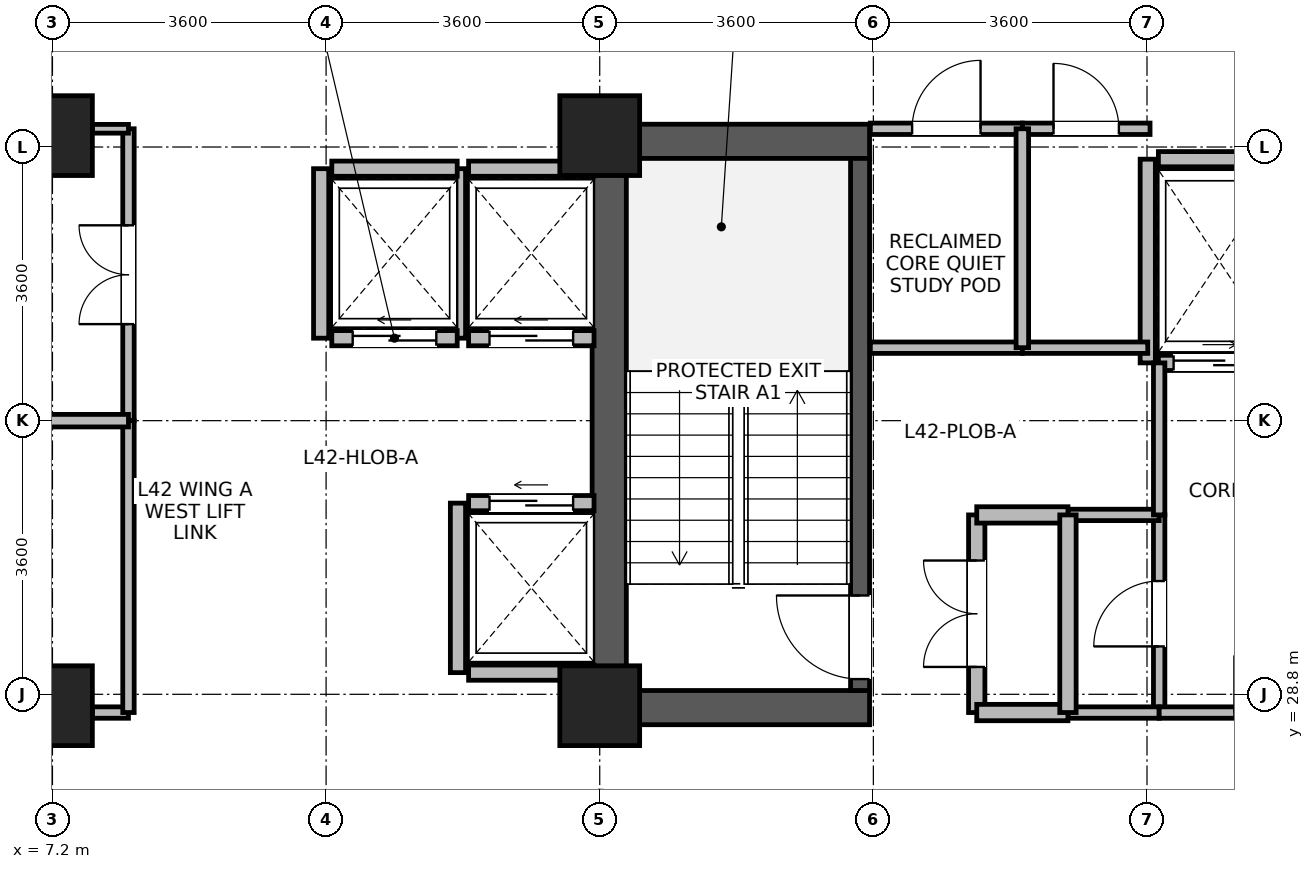
"""IFC4 building model, lengths in metres.
Left out: names, types, materials, properties, quantities, classifications, styles, units other than length and angle.
Written with IfcOpenShell. Run it as: python <this file> out.ifc"""

import sys

from ifc_helpers import new_model, si_unit, direction, frame, frame_2d, origin, origin_2d, place, context, subcontext, project, spatial, rectangle, extrude, source, transform, mapped, element, fill, save


model = new_model("IFC4")
c1 = context("Model", 3, precision=1e-05, world=origin(), true_north=direction((0.0, 1.0)))
c2 = subcontext(c1, "Body", "Model", "MODEL_VIEW")
j1 = project(units=[si_unit("LENGTHUNIT", "METRE"), si_unit("PLANEANGLEUNIT", "RADIAN")], contexts=[c1])
p1 = place(None, origin())
s1 = spatial("IfcSite", under=j1, at=p1, CompositionType="ELEMENT")
p2 = place(p1, origin())
s2 = spatial("IfcBuilding", under=s1, at=p2, CompositionType="ELEMENT")
p3 = place(p2, frame((0.0, 0.0, 166.1)))
s3 = spatial("IfcBuildingStorey", under=s2, at=p3, CompositionType="ELEMENT", Elevation=166.1)
p4 = place(p3, frame((14.525, 28.4, 0.0), z_axis=(0.0, 0.0, 1.0), x_axis=(0.0, 1.0, 0.0)))
e1 = element("IfcWall", 1, at=p4, inside=s3, PredefinedType="SHEAR", context=c2, shape_type="SweptSolid", body=[
    extrude(rectangle(XDim=7.9, YDim=0.45, at=frame_2d((3.95, 0.0))), origin(), (0.0, 0.0, 1.0), 3.46),
])
for number, where, z_axis, x_axis in (
    (2, (14.75, 28.625, 0.0), (0.0, 0.0, 1.0), (1.0, 0.0, 0.0)),
    (3, (14.75, 36.075, 0.0), (0.0, 0.0, 1.0), (1.0, 0.0, 0.0)),
):
    element("IfcWall", number, at=place(p3, frame(where, z_axis=z_axis, x_axis=x_axis)), inside=s3, PredefinedType="SHEAR", context=c2, shape_type="SweptSolid", body=[
        extrude(rectangle(XDim=3.2, YDim=0.45, at=frame_2d((1.6, 0.0))), origin(), (0.0, 0.0, 1.0), 3.46),
    ])
p5 = place(p3, frame((17.825, 28.85, 0.0), z_axis=(0.0, 0.0, 1.0), x_axis=(0.0, 1.0, 0.0)))
e4 = element("IfcWall", 4, at=p5, inside=s3, PredefinedType="SHEAR", context=c2, shape_type="SweptSolid", body=[
    extrude(rectangle(XDim=7.0, YDim=0.25, at=frame_2d((3.5, 0.0))), origin(), (0.0, 0.0, 1.0), 3.46),
])
p6 = place(p5, frame((0.15, 0.0, 0.0)))
e5 = element("IfcOpeningElement", 5, at=p6, cuts=e4, PredefinedType="OPENING", context=c2, shape_type="SweptSolid", body=[
    extrude(rectangle(XDim=1.1, YDim=2.08, at=frame_2d((0.55, 1.04))), frame((0.0, 0.135, 0.0), z_axis=(0.0, -1.0, 0.0), x_axis=(1.0, 0.0, 0.0)), (0.0, 0.0, 1.0), 0.27),
])
m1 = source(origin(), c2, "Body", "SweptSolid", [
    extrude(rectangle(XDim=1.05, YDim=1.05, at=origin_2d()), origin(), (0.0, 0.0, 1.0), 3.7),
])
for number, where, z_axis, x_axis in (
    (6, (7.2, 28.65, 0.0), (0.0, 0.0, 1.0), (1.0, 0.0, 0.0)),
    (7, (7.2, 36.15, 0.0), (0.0, 0.0, 1.0), (1.0, 0.0, 0.0)),
    (8, (14.4, 28.65, 0.0), (0.0, 0.0, 1.0), (1.0, 0.0, 0.0)),
    (9, (14.4, 36.15, 0.0), (0.0, 0.0, 1.0), (1.0, 0.0, 0.0)),
):
    element("IfcColumn", number, at=place(p3, frame(where, z_axis=z_axis, x_axis=x_axis)), inside=s3, PredefinedType="COLUMN", context=c2, shape_type="MappedRepresentation", body=[
        mapped(m1, transform((0.0, 0.0, 0.0), x_axis=(1.0, 0.0, 0.0), y_axis=(0.0, 1.0, 0.0), z_axis=(0.0, 0.0, 1.0), scale=1.0)),
    ])
p7 = place(p3, frame((12.675, 33.485, 0.0), z_axis=(0.0, 0.0, 1.0), x_axis=(1.0, 0.0, 0.0)))
e10 = element("IfcWall", 10, at=p7, inside=s3, PredefinedType="PARTITIONING", context=c2, shape_type="SweptSolid", body=[
    extrude(rectangle(XDim=1.65, YDim=0.2, at=frame_2d((0.825, 0.0))), origin(), (0.0, 0.0, 1.0), 3.44),
])
p8 = place(p7, frame((0.275, 0.0, 0.0)))
e11 = element("IfcOpeningElement", 11, at=p8, cuts=e10, PredefinedType="OPENING", context=c2, shape_type="SweptSolid", body=[
    extrude(rectangle(XDim=1.1, YDim=2.12, at=frame_2d((0.55, 1.06))), frame((0.0, 0.11, 0.0), z_axis=(0.0, -1.0, 0.0), x_axis=(1.0, 0.0, 0.0)), (0.0, 0.0, 1.0), 0.22),
])
p9 = place(p3, frame((12.675, 35.715, 0.0), z_axis=(0.0, 0.0, 1.0), x_axis=(1.0, 0.0, 0.0)))
e12 = element("IfcWall", 12, at=p9, inside=s3, PredefinedType="PARTITIONING", context=c2, shape_type="SweptSolid", body=[
    extrude(rectangle(XDim=1.65, YDim=0.2, at=frame_2d((0.825, 0.0))), origin(), (0.0, 0.0, 1.0), 3.44),
])
p10 = place(p3, frame((12.535, 33.485, 0.0), z_axis=(0.0, 0.0, 1.0), x_axis=(0.0, 1.0, 0.0)))
e13 = element("IfcWall", 13, at=p10, inside=s3, PredefinedType="PARTITIONING", context=c2, shape_type="SweptSolid", body=[
    extrude(rectangle(XDim=2.23, YDim=0.2, at=frame_2d((1.115, 0.0))), origin(), (0.0, 0.0, 1.0), 3.44),
])
p11 = place(p3, frame((12.675, 29.085, 0.0), z_axis=(0.0, 0.0, 1.0), x_axis=(1.0, 0.0, 0.0)))
e14 = element("IfcWall", 14, at=p11, inside=s3, PredefinedType="PARTITIONING", context=c2, shape_type="SweptSolid", body=[
    extrude(rectangle(XDim=1.65, YDim=0.2, at=frame_2d((0.825, 0.0))), origin(), (0.0, 0.0, 1.0), 3.44),
])
p12 = place(p3, frame((12.675, 31.315, 0.0), z_axis=(0.0, 0.0, 1.0), x_axis=(1.0, 0.0, 0.0)))
e15 = element("IfcWall", 15, at=p12, inside=s3, PredefinedType="PARTITIONING", context=c2, shape_type="SweptSolid", body=[
    extrude(rectangle(XDim=1.65, YDim=0.2, at=frame_2d((0.825, 0.0))), origin(), (0.0, 0.0, 1.0), 3.44),
])
p13 = place(p12, frame((0.275, 0.0, 0.0)))
e16 = element("IfcOpeningElement", 16, at=p13, cuts=e15, PredefinedType="OPENING", context=c2, shape_type="SweptSolid", body=[
    extrude(rectangle(XDim=1.1, YDim=2.12, at=frame_2d((0.55, 1.06))), frame((0.0, 0.11, 0.0), z_axis=(0.0, -1.0, 0.0), x_axis=(1.0, 0.0, 0.0)), (0.0, 0.0, 1.0), 0.22),
])
p14 = place(p3, frame((12.535, 29.085, 0.0), z_axis=(0.0, 0.0, 1.0), x_axis=(0.0, 1.0, 0.0)))
e17 = element("IfcWall", 17, at=p14, inside=s3, PredefinedType="PARTITIONING", context=c2, shape_type="SweptSolid", body=[
    extrude(rectangle(XDim=2.23, YDim=0.2, at=frame_2d((1.115, 0.0))), origin(), (0.0, 0.0, 1.0), 3.44),
])
p15 = place(p3, frame((10.875, 33.485, 0.0), z_axis=(0.0, 0.0, 1.0), x_axis=(1.0, 0.0, 0.0)))
e18 = element("IfcWall", 18, at=p15, inside=s3, PredefinedType="PARTITIONING", context=c2, shape_type="SweptSolid", body=[
    extrude(rectangle(XDim=1.65, YDim=0.2, at=frame_2d((0.825, 0.0))), origin(), (0.0, 0.0, 1.0), 3.44),
])
p16 = place(p15, frame((0.275, 0.0, 0.0)))
e19 = element("IfcOpeningElement", 19, at=p16, cuts=e18, PredefinedType="OPENING", context=c2, shape_type="SweptSolid", body=[
    extrude(rectangle(XDim=1.1, YDim=2.12, at=frame_2d((0.55, 1.06))), frame((0.0, 0.11, 0.0), z_axis=(0.0, -1.0, 0.0), x_axis=(1.0, 0.0, 0.0)), (0.0, 0.0, 1.0), 0.22),
])
p17 = place(p3, frame((10.875, 35.715, 0.0), z_axis=(0.0, 0.0, 1.0), x_axis=(1.0, 0.0, 0.0)))
e20 = element("IfcWall", 20, at=p17, inside=s3, PredefinedType="PARTITIONING", context=c2, shape_type="SweptSolid", body=[
    extrude(rectangle(XDim=1.65, YDim=0.2, at=frame_2d((0.825, 0.0))), origin(), (0.0, 0.0, 1.0), 3.44),
])
p18 = place(p3, frame((10.735, 33.485, 0.0), z_axis=(0.0, 0.0, 1.0), x_axis=(0.0, 1.0, 0.0)))
e21 = element("IfcWall", 21, at=p18, inside=s3, PredefinedType="PARTITIONING", context=c2, shape_type="SweptSolid", body=[
    extrude(rectangle(XDim=2.23, YDim=0.2, at=frame_2d((1.115, 0.0))), origin(), (0.0, 0.0, 1.0), 3.44),
])
p19 = place(p3, frame((21.75, 33.16, 0.0), z_axis=(0.0, 0.0, 1.0), x_axis=(1.0, 0.0, 0.0)))
e22 = element("IfcWall", 22, at=p19, inside=s3, PredefinedType="PARTITIONING", context=c2, shape_type="SweptSolid", body=[
    extrude(rectangle(XDim=1.6, YDim=0.2, at=frame_2d((0.8, 0.0))), origin(), (0.0, 0.0, 1.0), 3.44),
])
p20 = place(p19, frame((0.2, 0.0, 0.0)))
e23 = element("IfcOpeningElement", 23, at=p20, cuts=e22, PredefinedType="OPENING", context=c2, shape_type="SweptSolid", body=[
    extrude(rectangle(XDim=1.2, YDim=2.12, at=frame_2d((0.6, 1.06))), frame((0.0, 0.11, 0.0), z_axis=(0.0, -1.0, 0.0), x_axis=(1.0, 0.0, 0.0)), (0.0, 0.0, 1.0), 0.22),
])
p21 = place(p3, frame((21.75, 35.84, 0.0), z_axis=(0.0, 0.0, 1.0), x_axis=(1.0, 0.0, 0.0)))
e24 = element("IfcWall", 24, at=p21, inside=s3, PredefinedType="PARTITIONING", context=c2, shape_type="SweptSolid", body=[
    extrude(rectangle(XDim=1.6, YDim=0.2, at=frame_2d((0.8, 0.0))), origin(), (0.0, 0.0, 1.0), 2.44),
])
p22 = place(p3, frame((21.61, 33.16, 0.0), z_axis=(0.0, 0.0, 1.0), x_axis=(0.0, 1.0, 0.0)))
e25 = element("IfcWall", 25, at=p22, inside=s3, PredefinedType="PARTITIONING", context=c2, shape_type="SweptSolid", body=[
    extrude(rectangle(XDim=2.68, YDim=0.2, at=frame_2d((1.34, 0.0))), origin(), (0.0, 0.0, 1.0), 3.44),
])
p23 = place(p3, frame((7.725, 28.56, 0.0), z_axis=(0.0, 0.0, 1.0), x_axis=(1.0, 0.0, 0.0)))
e26 = element("IfcWall", 26, at=p23, inside=s3, PredefinedType="PARTITIONING", context=c2, shape_type="SweptSolid", body=[
    extrude(rectangle(XDim=0.475, YDim=0.15, at=frame_2d((0.237, 0.0))), origin(), (0.0, 0.0, 1.0), 2.84),
])
p24 = place(p3, frame((8.2, 32.4, 0.0), z_axis=(0.0, 0.0, 1.0), x_axis=(0.0, 1.0, 0.0)))
e27 = element("IfcWall", 27, at=p24, inside=s3, PredefinedType="PARTITIONING", context=c2, shape_type="SweptSolid", body=[
    extrude(rectangle(XDim=3.84, YDim=0.15, at=frame_2d((1.92, 0.0))), origin(), (0.0, 0.0, 1.0), 3.44),
])
p25 = place(p24, frame((1.27, 0.0, 0.0)))
e28 = element("IfcOpeningElement", 28, at=p25, cuts=e27, PredefinedType="OPENING", context=c2, shape_type="SweptSolid", body=[
    extrude(rectangle(XDim=1.3, YDim=2.12, at=frame_2d((0.65, 1.06))), frame((0.0, 0.085, 0.0), z_axis=(0.0, -1.0, 0.0), x_axis=(1.0, 0.0, 0.0)), (0.0, 0.0, 1.0), 0.17),
])
p26 = place(p3, frame((8.2, 28.56, 0.0), z_axis=(0.0, 0.0, 1.0), x_axis=(0.0, 1.0, 0.0)))
e29 = element("IfcWall", 29, at=p26, inside=s3, PredefinedType="PARTITIONING", context=c2, shape_type="SweptSolid", body=[
    extrude(rectangle(XDim=3.84, YDim=0.15, at=frame_2d((1.92, 0.0))), origin(), (0.0, 0.0, 1.0), 3.44),
])
p27 = place(p3, frame((19.36, 28.56, 0.0), z_axis=(0.0, 0.0, 1.0), x_axis=(0.0, 1.0, 0.0)))
e30 = element("IfcWall", 30, at=p27, inside=s3, PredefinedType="PARTITIONING", context=c2, shape_type="SweptSolid", body=[
    extrude(rectangle(XDim=2.6, YDim=0.215, at=frame_2d((1.3, 0.0))), origin(), (0.0, 0.0, 1.0), 3.44),
])
p28 = place(p27, frame((0.6, 0.0, 0.0)))
e31 = element("IfcOpeningElement", 31, at=p28, cuts=e30, PredefinedType="OPENING", context=c2, shape_type="SweptSolid", body=[
    extrude(rectangle(XDim=1.4, YDim=2.15, at=frame_2d((0.7, 1.075))), frame((0.0, 0.118, 0.0), z_axis=(0.0, -1.0, 0.0), x_axis=(1.0, 0.0, 0.0)), (0.0, 0.0, 1.0), 0.235),
])
p29 = place(p3, frame((21.76, 28.56, 0.0), z_axis=(0.0, 0.0, 1.0), x_axis=(0.0, 1.0, 0.0)))
e32 = element("IfcWall", 32, at=p29, inside=s3, PredefinedType="PARTITIONING", context=c2, shape_type="SweptSolid", body=[
    extrude(rectangle(XDim=2.6, YDim=0.15, at=frame_2d((1.3, 0.0))), origin(), (0.0, 0.0, 1.0), 3.44),
])
p30 = place(p29, frame((0.87, 0.0, 0.0)))
e33 = element("IfcOpeningElement", 33, at=p30, cuts=e32, PredefinedType="OPENING", context=c2, shape_type="SweptSolid", body=[
    extrude(rectangle(XDim=0.86, YDim=2.02, at=frame_2d((0.43, 1.01))), frame((0.0, 0.085, 0.0), z_axis=(0.0, -1.0, 0.0), x_axis=(1.0, 0.0, 0.0)), (0.0, 0.0, 1.0), 0.17),
])
p31 = place(p3, frame((17.96, 33.36, 0.0), z_axis=(0.0, 0.0, 1.0), x_axis=(1.0, 0.0, 0.0)))
e34 = element("IfcWall", 34, at=p31, inside=s3, PredefinedType="PARTITIONING", context=c2, shape_type="SweptSolid", body=[
    extrude(rectangle(XDim=2.0, YDim=0.15, at=frame_2d((1.0, 0.0))), origin(), (0.0, 0.0, 1.0), 3.44),
])
p32 = place(p3, frame((17.96, 36.24, 0.0), z_axis=(0.0, 0.0, 1.0), x_axis=(1.0, 0.0, 0.0)))
e35 = element("IfcWall", 35, at=p32, inside=s3, PredefinedType="PARTITIONING", context=c2, shape_type="SweptSolid", body=[
    extrude(rectangle(XDim=2.0, YDim=0.15, at=frame_2d((1.0, 0.0))), origin(), (0.0, 0.0, 1.0), 2.44),
])
p33 = place(p32, frame((0.55, 0.0, 0.0)))
e36 = element("IfcOpeningElement", 36, at=p33, cuts=e35, PredefinedType="OPENING", context=c2, shape_type="SweptSolid", body=[
    extrude(rectangle(XDim=0.9, YDim=2.08, at=frame_2d((0.45, 1.04))), frame((0.0, 0.085, 0.0), z_axis=(0.0, -1.0, 0.0), x_axis=(1.0, 0.0, 0.0)), (0.0, 0.0, 1.0), 0.17),
])
p34 = place(p3, frame((19.96, 33.36, 0.0), z_axis=(0.0, 0.0, 1.0), x_axis=(1.0, 0.0, 0.0)))
e37 = element("IfcWall", 37, at=p34, inside=s3, PredefinedType="PARTITIONING", context=c2, shape_type="SweptSolid", body=[
    extrude(rectangle(XDim=1.65, YDim=0.15, at=frame_2d((0.825, 0.0))), origin(), (0.0, 0.0, 1.0), 3.44),
])
p35 = place(p3, frame((19.96, 36.24, 0.0), z_axis=(0.0, 0.0, 1.0), x_axis=(1.0, 0.0, 0.0)))
e38 = element("IfcWall", 38, at=p35, inside=s3, PredefinedType="PARTITIONING", context=c2, shape_type="SweptSolid", body=[
    extrude(rectangle(XDim=1.68, YDim=0.15, at=frame_2d((0.84, 0.0))), origin(), (0.0, 0.0, 1.0), 2.44),
])
p36 = place(p35, frame((0.41, 0.0, 0.0)))
e39 = element("IfcOpeningElement", 39, at=p36, cuts=e38, PredefinedType="OPENING", context=c2, shape_type="SweptSolid", body=[
    extrude(rectangle(XDim=0.86, YDim=2.02, at=frame_2d((0.43, 1.01))), frame((0.0, 0.085, 0.0), z_axis=(0.0, -1.0, 0.0), x_axis=(1.0, 0.0, 0.0)), (0.0, 0.0, 1.0), 0.17),
])
p37 = place(p3, frame((20.56, 28.56, 0.0), z_axis=(0.0, 0.0, 1.0), x_axis=(1.0, 0.0, 0.0)))
e40 = element("IfcWall", 40, at=p37, inside=s3, PredefinedType="PARTITIONING", context=c2, shape_type="SweptSolid", body=[
    extrude(rectangle(XDim=1.2, YDim=0.15, at=frame_2d((0.6, 0.0))), origin(), (0.0, 0.0, 1.0), 2.44),
])
p38 = place(p3, frame((20.56, 31.16, 0.0), z_axis=(0.0, 0.0, 1.0), x_axis=(1.0, 0.0, 0.0)))
e41 = element("IfcWall", 41, at=p38, inside=s3, PredefinedType="PARTITIONING", context=c2, shape_type="SweptSolid", body=[
    extrude(rectangle(XDim=1.2, YDim=0.15, at=frame_2d((0.6, 0.0))), origin(), (0.0, 0.0, 1.0), 3.44),
])
p39 = place(p3, frame((19.36, 28.56, 0.0), z_axis=(0.0, 0.0, 1.0), x_axis=(1.0, 0.0, 0.0)))
e42 = element("IfcWall", 42, at=p39, inside=s3, PredefinedType="PARTITIONING", context=c2, shape_type="SweptSolid", body=[
    extrude(rectangle(XDim=1.2, YDim=0.215, at=frame_2d((0.6, 0.0))), origin(), (0.0, 0.0, 1.0), 2.44),
])
p40 = place(p3, frame((19.36, 31.16, 0.0), z_axis=(0.0, 0.0, 1.0), x_axis=(1.0, 0.0, 0.0)))
e43 = element("IfcWall", 43, at=p40, inside=s3, PredefinedType="PARTITIONING", context=c2, shape_type="SweptSolid", body=[
    extrude(rectangle(XDim=1.2, YDim=0.215, at=frame_2d((0.6, 0.0))), origin(), (0.0, 0.0, 1.0), 3.44),
])
p41 = place(p3, frame((0.632, 32.4, 0.0), z_axis=(0.0, 0.0, 1.0), x_axis=(1.0, 0.0, 0.0)))
e44 = element("IfcWall", 44, at=p41, inside=s3, PredefinedType="PARTITIONING", context=c2, shape_type="SweptSolid", body=[
    extrude(rectangle(XDim=7.568, YDim=0.165, at=frame_2d((3.784, 0.0))), origin(), (0.0, 0.0, 1.0), 3.44),
])
p42 = place(p3, frame((7.725, 36.24, 0.0), z_axis=(0.0, 0.0, 1.0), x_axis=(1.0, 0.0, 0.0)))
e45 = element("IfcWall", 45, at=p42, inside=s3, PredefinedType="PARTITIONING", context=c2, shape_type="SweptSolid", body=[
    extrude(rectangle(XDim=0.475, YDim=0.115, at=frame_2d((0.237, 0.0))), origin(), (0.0, 0.0, 1.0), 2.84),
])
p43 = place(p3, frame((21.76, 28.56, 0.0), z_axis=(0.0, 0.0, 1.0), x_axis=(1.0, 0.0, 0.0)))
e46 = element("IfcWall", 46, at=p43, inside=s3, PredefinedType="PARTITIONING", context=c2, shape_type="SweptSolid", body=[
    extrude(rectangle(XDim=3.48, YDim=0.15, at=frame_2d((1.74, 0.0))), origin(), (0.0, 0.0, 1.0), 2.44),
])
p44 = place(p43, frame((0.99, 0.0, 0.0)))
e47 = element("IfcOpeningElement", 47, at=p44, cuts=e46, PredefinedType="OPENING", context=c2, shape_type="SweptSolid", body=[
    extrude(rectangle(XDim=1.5, YDim=2.1, at=frame_2d((0.75, 1.05))), frame((0.0, 0.085, 0.0), z_axis=(0.0, -1.0, 0.0), x_axis=(1.0, 0.0, 0.0)), (0.0, 0.0, 1.0), 0.17),
])
p45 = place(p3, frame((19.96, 33.36, 0.0), z_axis=(0.0, 0.0, 1.0), x_axis=(0.0, 1.0, 0.0)))
e48 = element("IfcWall", 48, at=p45, inside=s3, PredefinedType="PARTITIONING", context=c2, shape_type="SweptSolid", body=[
    extrude(rectangle(XDim=2.88, YDim=0.165, at=frame_2d((1.44, 0.0))), origin(), (0.0, 0.0, 1.0), 3.44),
])
p46 = place(p3, frame((20.56, 28.56, 0.0), z_axis=(0.0, 0.0, 1.0), x_axis=(0.0, 1.0, 0.0)))
e49 = element("IfcWall", 49, at=p46, inside=s3, PredefinedType="PARTITIONING", context=c2, shape_type="SweptSolid", body=[
    extrude(rectangle(XDim=2.6, YDim=0.215, at=frame_2d((1.3, 0.0))), origin(), (0.0, 0.0, 1.0), 3.44),
])
p47 = place(p3, frame((21.76, 31.16, 0.0), z_axis=(0.0, 0.0, 1.0), x_axis=(0.0, 1.0, 0.0)))
e50 = element("IfcWall", 50, at=p47, inside=s3, PredefinedType="PARTITIONING", context=c2, shape_type="SweptSolid", body=[
    extrude(rectangle(XDim=2.0, YDim=0.15, at=frame_2d((1.0, 0.0))), origin(), (0.0, 0.0, 1.0), 3.44),
])
p48 = place(p6, origin())
e51 = element("IfcDoor", 51, at=p48, inside=s3, OperationType="SINGLE_SWING_RIGHT", PredefinedType="DOOR", context=c2, shape_type="SweptSolid", body=[
    extrude(rectangle(XDim=1.1, YDim=2.08, at=frame_2d((0.55, 1.04))), frame((0.0, 0.025, 0.0), z_axis=(0.0, -1.0, 0.0), x_axis=(1.0, 0.0, 0.0)), (0.0, 0.0, 1.0), 0.05),
])
fill(e5, e51)
p49 = place(p8, origin())
e52 = element("IfcDoor", 52, at=p49, inside=s3, OperationType="SLIDING_TO_LEFT", PredefinedType="DOOR", context=c2, shape_type="SweptSolid", body=[
    extrude(rectangle(XDim=1.1, YDim=2.12, at=frame_2d((0.55, 1.06))), frame((0.0, 0.025, 0.0), z_axis=(0.0, -1.0, 0.0), x_axis=(1.0, 0.0, 0.0)), (0.0, 0.0, 1.0), 0.05),
])
fill(e11, e52)
p50 = place(p13, origin())
e53 = element("IfcDoor", 53, at=p50, inside=s3, OperationType="SLIDING_TO_LEFT", PredefinedType="DOOR", context=c2, shape_type="SweptSolid", body=[
    extrude(rectangle(XDim=1.1, YDim=2.12, at=frame_2d((0.55, 1.06))), frame((0.0, 0.025, 0.0), z_axis=(0.0, -1.0, 0.0), x_axis=(1.0, 0.0, 0.0)), (0.0, 0.0, 1.0), 0.05),
])
fill(e16, e53)
p51 = place(p16, origin())
e54 = element("IfcDoor", 54, at=p51, inside=s3, OperationType="SLIDING_TO_LEFT", PredefinedType="DOOR", context=c2, shape_type="SweptSolid", body=[
    extrude(rectangle(XDim=1.1, YDim=2.12, at=frame_2d((0.55, 1.06))), frame((0.0, 0.025, 0.0), z_axis=(0.0, -1.0, 0.0), x_axis=(1.0, 0.0, 0.0)), (0.0, 0.0, 1.0), 0.05),
])
fill(e19, e54)
p52 = place(p20, origin())
e55 = element("IfcDoor", 55, at=p52, inside=s3, OperationType="SLIDING_TO_RIGHT", PredefinedType="DOOR", context=c2, shape_type="SweptSolid", body=[
    extrude(rectangle(XDim=1.2, YDim=2.12, at=frame_2d((0.6, 1.06))), frame((0.0, 0.025, 0.0), z_axis=(0.0, -1.0, 0.0), x_axis=(1.0, 0.0, 0.0)), (0.0, 0.0, 1.0), 0.05),
])
fill(e23, e55)
p53 = place(p25, origin())
e56 = element("IfcDoor", 56, at=p53, inside=s3, OperationType="DOUBLE_DOOR_SINGLE_SWING", PredefinedType="DOOR", context=c2, shape_type="SweptSolid", body=[
    extrude(rectangle(XDim=1.3, YDim=2.12, at=frame_2d((0.65, 1.06))), frame((0.0, 0.025, 0.0), z_axis=(0.0, -1.0, 0.0), x_axis=(1.0, 0.0, 0.0)), (0.0, 0.0, 1.0), 0.05),
])
fill(e28, e56)
p54 = place(p28, origin())
e57 = element("IfcDoor", 57, at=p54, inside=s3, OperationType="DOUBLE_DOOR_SINGLE_SWING", PredefinedType="DOOR", context=c2, shape_type="SweptSolid", body=[
    extrude(rectangle(XDim=1.4, YDim=2.15, at=frame_2d((0.7, 1.075))), frame((0.0, 0.025, 0.0), z_axis=(0.0, -1.0, 0.0), x_axis=(1.0, 0.0, 0.0)), (0.0, 0.0, 1.0), 0.05),
])
fill(e31, e57)
p55 = place(p30, origin())
e58 = element("IfcDoor", 58, at=p55, inside=s3, OperationType="SINGLE_SWING_LEFT", PredefinedType="DOOR", context=c2, shape_type="SweptSolid", body=[
    extrude(rectangle(XDim=0.86, YDim=2.02, at=frame_2d((0.43, 1.01))), frame((0.0, 0.025, 0.0), z_axis=(0.0, -1.0, 0.0), x_axis=(1.0, 0.0, 0.0)), (0.0, 0.0, 1.0), 0.05),
])
fill(e33, e58)
p56 = place(p33, origin())
e59 = element("IfcDoor", 59, at=p56, inside=s3, OperationType="SINGLE_SWING_RIGHT", PredefinedType="DOOR", context=c2, shape_type="SweptSolid", body=[
    extrude(rectangle(XDim=0.9, YDim=2.08, at=frame_2d((0.45, 1.04))), frame((0.0, 0.025, 0.0), z_axis=(0.0, -1.0, 0.0), x_axis=(1.0, 0.0, 0.0)), (0.0, 0.0, 1.0), 0.05),
])
fill(e36, e59)
p57 = place(p36, origin())
e60 = element("IfcDoor", 60, at=p57, inside=s3, OperationType="SINGLE_SWING_LEFT", PredefinedType="DOOR", context=c2, shape_type="SweptSolid", body=[
    extrude(rectangle(XDim=0.86, YDim=2.02, at=frame_2d((0.43, 1.01))), frame((0.0, 0.025, 0.0), z_axis=(0.0, -1.0, 0.0), x_axis=(1.0, 0.0, 0.0)), (0.0, 0.0, 1.0), 0.05),
])
fill(e39, e60)
save(model, sys.argv[1])
